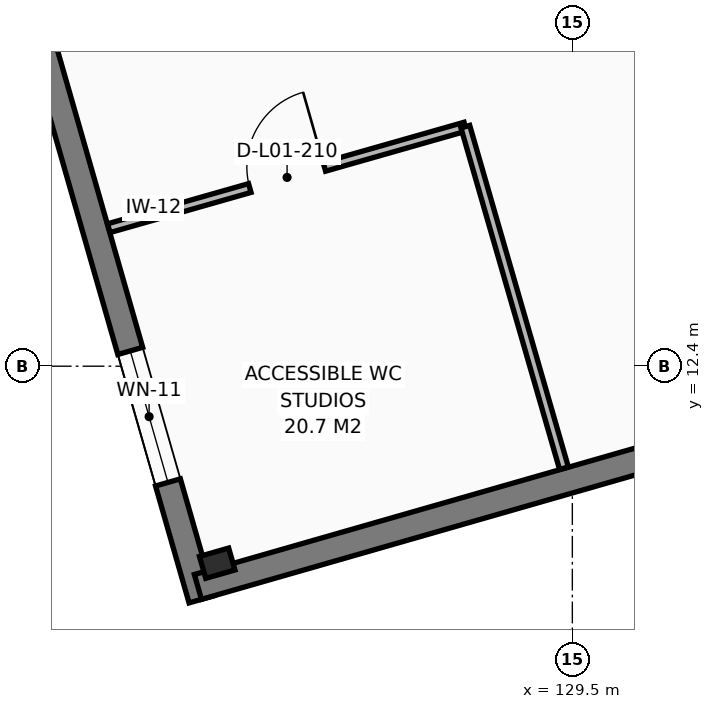
"""IFC4 building model, lengths in metres.
Left out: names, types, materials, properties, quantities, classifications, styles, units other than length and angle.
Written with IfcOpenShell. Run it as: python <this file> out.ifc"""

import sys

from ifc_helpers import new_model, si_unit, direction, frame, frame_2d, origin, origin_2d, place, context, subcontext, project, spatial, rectangle, i_section, extrude, element, fill, save


model = new_model("IFC4")
c1 = context("Model", 3, precision=1e-05, world=origin(), true_north=direction((0.0, 1.0)))
c2 = subcontext(c1, "Body", "Model", "MODEL_VIEW")
j1 = project(units=[si_unit("LENGTHUNIT", "METRE"), si_unit("PLANEANGLEUNIT", "RADIAN")], contexts=[c1])
p1 = place(None, origin())
s1 = spatial("IfcSite", under=j1, at=p1, CompositionType="ELEMENT")
p2 = place(p1, origin())
s2 = spatial("IfcBuilding", under=s1, at=p2, CompositionType="ELEMENT")
p3 = place(p2, frame((0.0, 0.0, 5.1)))
s3 = spatial("IfcBuildingStorey", under=s2, at=p3, CompositionType="ELEMENT", Elevation=5.1)
p4 = place(p3, frame((124.827, 9.808, 0.0), z_axis=(0.0, 0.0, 1.0), x_axis=(0.961261695938, 0.275637355817, 0.0)))
e1 = element("IfcColumn", 1, at=p4, inside=s3, PredefinedType="COLUMN", context=c2, shape_type="SweptSolid", body=[
    extrude(i_section(OverallWidth=0.3, OverallDepth=0.4, WebThickness=0.013, FlangeThickness=0.024, FilletRadius=0.027, at=origin_2d()), origin(), (0.0, 0.0, 1.0), 4.42),
])
p5 = place(p3, frame((124.621, 9.333, 0.0), z_axis=(0.0, 0.0, 1.0), x_axis=(-0.275637565206, 0.961261635897, 0.0)))
e2 = element("IfcWall", 2, at=p5, inside=s3, PredefinedType="SOLIDWALL", context=c2, shape_type="SweptSolid", body=[
    extrude(rectangle(XDim=23.289, YDim=0.34, at=frame_2d((11.645, 0.0))), origin(), (0.0, 0.0, 1.0), 4.2),
])
p6 = place(p5, frame((1.6, 0.0, 0.85)))
e3 = element("IfcOpeningElement", 3, at=p6, cuts=e2, PredefinedType="OPENING", context=c2, shape_type="SweptSolid", body=[
    extrude(rectangle(XDim=1.8, YDim=1.7, at=frame_2d((0.9, 0.85))), frame((0.0, 0.18, 0.0), z_axis=(0.0, -1.0, 0.0), x_axis=(1.0, 0.0, 0.0)), (0.0, 0.0, 1.0), 0.36),
])
p7 = place(p5, frame((14.993, 0.0, 0.85)))
e4 = element("IfcOpeningElement", 4, at=p7, cuts=e2, PredefinedType="OPENING", context=c2, shape_type="SweptSolid", body=[
    extrude(rectangle(XDim=2.0, YDim=1.3, at=frame_2d((1.0, 0.65))), frame((0.0, 0.18, 0.0), z_axis=(0.0, -1.0, 0.0), x_axis=(1.0, 0.0, 0.0)), (0.0, 0.0, 1.0), 0.36),
])
p8 = place(p3, frame((160.938, 19.924, 0.0), z_axis=(0.0, 0.0, 1.0), x_axis=(-0.961260735733, -0.275640704428, 0.0)))
e5 = element("IfcWall", 5, at=p8, inside=s3, PredefinedType="SOLIDWALL", context=c2, shape_type="SweptSolid", body=[
    extrude(rectangle(XDim=37.83, YDim=0.34, at=frame_2d((18.915, 0.0))), origin(), (0.0, 0.0, 1.0), 4.2),
])
p9 = place(p8, frame((1.6, 0.0, 0.85)))
e6 = element("IfcOpeningElement", 6, at=p9, cuts=e5, PredefinedType="OPENING", context=c2, shape_type="SweptSolid", body=[
    extrude(rectangle(XDim=1.3, YDim=1.6, at=frame_2d((0.65, 0.8))), frame((0.0, 0.18, 0.0), z_axis=(0.0, -1.0, 0.0), x_axis=(1.0, 0.0, 0.0)), (0.0, 0.0, 1.0), 0.36),
])
p10 = place(p8, frame((8.526, 0.0, 0.85)))
e7 = element("IfcOpeningElement", 7, at=p10, cuts=e5, PredefinedType="OPENING", context=c2, shape_type="SweptSolid", body=[
    extrude(rectangle(XDim=1.6, YDim=1.6, at=frame_2d((0.8, 0.8))), frame((0.0, 0.18, 0.0), z_axis=(0.0, -1.0, 0.0), x_axis=(1.0, 0.0, 0.0)), (0.0, 0.0, 1.0), 0.36),
])
p11 = place(p8, frame((15.452, 0.0, 0.85)))
e8 = element("IfcOpeningElement", 8, at=p11, cuts=e5, PredefinedType="OPENING", context=c2, shape_type="SweptSolid", body=[
    extrude(rectangle(XDim=1.9, YDim=1.6, at=frame_2d((0.95, 0.8))), frame((0.0, 0.18, 0.0), z_axis=(0.0, -1.0, 0.0), x_axis=(1.0, 0.0, 0.0)), (0.0, 0.0, 1.0), 0.36),
])
p12 = place(p8, frame((29.304, 0.0, 0.85)))
e9 = element("IfcOpeningElement", 9, at=p12, cuts=e5, PredefinedType="OPENING", context=c2, shape_type="SweptSolid", body=[
    extrude(rectangle(XDim=1.35, YDim=1.5, at=frame_2d((0.675, 0.75))), frame((0.0, 0.18, 0.0), z_axis=(0.0, -1.0, 0.0), x_axis=(1.0, 0.0, 0.0)), (0.0, 0.0, 1.0), 0.36),
])
p13 = place(p3, frame((123.401, 14.216, 0.0), z_axis=(0.0, 0.0, 1.0), x_axis=(0.961754062565, 0.273914444926, 0.0)))
e10 = element("IfcWall", 10, at=p13, inside=s3, PredefinedType="PARTITIONING", context=c2, shape_type="SweptSolid", body=[
    extrude(rectangle(XDim=4.877, YDim=0.12, at=frame_2d((2.438, 0.0))), origin(), (0.0, 0.0, 1.0), 3.74),
])
p14 = place(p13, frame((1.929, 0.0, 0.0)))
e11 = element("IfcOpeningElement", 11, at=p14, cuts=e10, PredefinedType="OPENING", context=c2, shape_type="SweptSolid", body=[
    extrude(rectangle(XDim=1.02, YDim=2.12, at=frame_2d((0.51, 1.06))), frame((0.0, 0.07, 0.0), z_axis=(0.0, -1.0, 0.0), x_axis=(1.0, 0.0, 0.0)), (0.0, 0.0, 1.0), 0.14),
])
p15 = place(p3, frame((128.092, 15.552, 0.0), z_axis=(0.0, 0.0, 1.0), x_axis=(0.277429379743, -0.960746032652, 0.0)))
e12 = element("IfcWall", 12, at=p15, inside=s3, PredefinedType="PARTITIONING", context=c2, shape_type="SweptSolid", body=[
    extrude(rectangle(XDim=4.677, YDim=0.12, at=frame_2d((2.339, 0.0))), origin(), (0.0, 0.0, 1.0), 3.69),
])
p16 = place(p6, origin())
e13 = element("IfcWindow", 13, at=p16, inside=s3, PartitioningType="SINGLE_PANEL", PredefinedType="WINDOW", context=c2, shape_type="SweptSolid", body=[
    extrude(rectangle(XDim=1.8, YDim=1.7, at=frame_2d((0.9, 0.85))), frame((0.0, 0.03, 0.0), z_axis=(0.0, -1.0, 0.0), x_axis=(1.0, 0.0, 0.0)), (0.0, 0.0, 1.0), 0.06),
])
fill(e3, e13)
p17 = place(p14, origin())
e14 = element("IfcDoor", 14, at=p17, inside=s3, OperationType="SINGLE_SWING_RIGHT", PredefinedType="DOOR", context=c2, shape_type="SweptSolid", body=[
    extrude(rectangle(XDim=1.02, YDim=2.12, at=frame_2d((0.51, 1.06))), frame((0.0, 0.025, 0.0), z_axis=(0.0, -1.0, 0.0), x_axis=(1.0, 0.0, 0.0)), (0.0, 0.0, 1.0), 0.05),
])
fill(e11, e14)
save(model, sys.argv[1])
